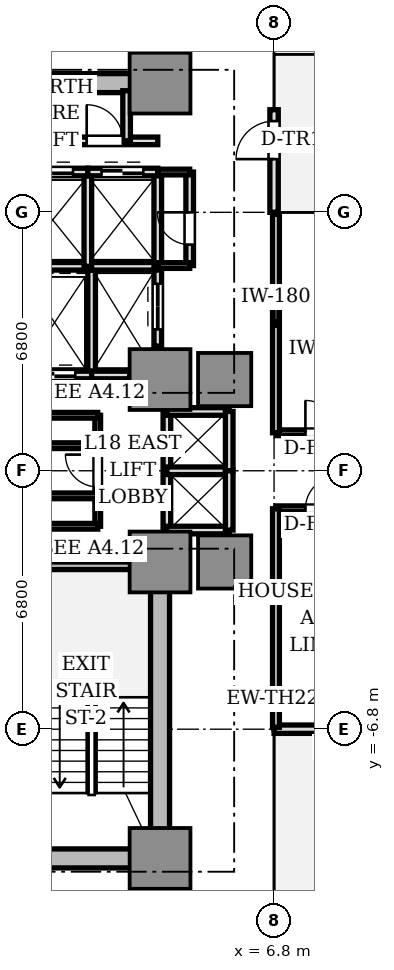
"""IFC4 building model, lengths in metres.
Left out: names, types, materials, properties, quantities, classifications, styles, units other than length and angle.
Written with IfcOpenShell. Run it as: python <this file> out.ifc"""

import sys

from ifc_helpers import new_model, si_unit, direction, frame, frame_2d, origin, origin_2d, place, context, subcontext, project, spatial, rectangle, extrude, source, transform, mapped, element, fill, save


model = new_model("IFC4")
c1 = context("Model", 3, precision=1e-05, world=origin(), true_north=direction((0.0, 1.0)))
c2 = subcontext(c1, "Body", "Model", "MODEL_VIEW")
j1 = project(units=[si_unit("LENGTHUNIT", "METRE"), si_unit("PLANEANGLEUNIT", "RADIAN")], contexts=[c1])
p1 = place(None, origin())
s1 = spatial("IfcSite", under=j1, at=p1, CompositionType="ELEMENT")
p2 = place(p1, origin())
s2 = spatial("IfcBuilding", under=s1, at=p2, CompositionType="ELEMENT")
p3 = place(p2, frame((0.0, 0.0, 67.8)))
s3 = spatial("IfcBuildingStorey", under=s2, at=p3, CompositionType="ELEMENT", Elevation=67.8)
for number, where, z_axis, x_axis in (
    (1, (-3.55, 10.2, 0.0), (0.0, 0.0, 1.0), (1.0, 0.0, 0.0)),
    (2, (-3.55, -10.2, 0.0), (0.0, 0.0, 1.0), (1.0, 0.0, 0.0)),
):
    element("IfcWall", number, at=place(p3, frame(where, z_axis=z_axis, x_axis=x_axis)), inside=s3, PredefinedType="SHEAR", context=c2, shape_type="SweptSolid", body=[
        extrude(rectangle(XDim=7.1, YDim=0.5, at=frame_2d((3.55, 0.0))), origin(), (0.0, 0.0, 1.0), 3.11),
    ])
p4 = place(p3, frame((3.8, -9.75, 0.0), z_axis=(0.0, 0.0, 1.0), x_axis=(0.0, 1.0, 0.0)))
e3 = element("IfcWall", 3, at=p4, inside=s3, PredefinedType="SHEAR", context=c2, shape_type="SweptSolid", body=[
    extrude(rectangle(XDim=6.9, YDim=0.5, at=frame_2d((3.45, 0.0))), origin(), (0.0, 0.0, 1.0), 3.11),
])
m1 = source(origin(), c2, "Body", "SweptSolid", [
    extrude(rectangle(XDim=1.6, YDim=1.6, at=origin_2d()), origin(), (0.0, 0.0, 1.0), 3.11),
])
for number, where, z_axis, x_axis in (
    (4, (3.8, 2.4, 0.0), (0.0, 0.0, 1.0), (1.0, 0.0, 0.0)),
    (5, (3.8, 10.2, 0.0), (0.0, 0.0, 1.0), (1.0, 0.0, 0.0)),
    (6, (3.8, -2.4, 0.0), (0.0, 0.0, 1.0), (1.0, 0.0, 0.0)),
    (7, (3.8, -10.2, 0.0), (0.0, 0.0, 1.0), (1.0, 0.0, 0.0)),
):
    element("IfcColumn", number, at=place(p3, frame(where, z_axis=z_axis, x_axis=x_axis)), inside=s3, PredefinedType="COLUMN", context=c2, shape_type="MappedRepresentation", body=[
        mapped(m1, transform((0.0, 0.0, 0.0), scale=1.0)),
    ])
m2 = source(origin(), c2, "Body", "SweptSolid", [
    extrude(rectangle(XDim=1.4, YDim=1.4, at=origin_2d()), origin(), (0.0, 0.0, 1.0), 3.11),
])
for number, where, z_axis, x_axis in (
    (8, (5.5, 2.4, 0.0), (0.0, 0.0, 1.0), (1.0, 0.0, 0.0)),
    (9, (5.5, -2.4, 0.0), (0.0, 0.0, 1.0), (1.0, 0.0, 0.0)),
):
    element("IfcColumn", number, at=place(p3, frame(where, z_axis=z_axis, x_axis=x_axis)), inside=s3, PredefinedType="COLUMN", context=c2, shape_type="MappedRepresentation", body=[
        mapped(m2, transform((0.0, 0.0, 0.0), scale=1.0)),
    ])
p5 = place(p3, frame((6.8, -6.8, 0.0), z_axis=(0.0, 0.0, 1.0), x_axis=(1.0, 0.0, 0.0)))
e10 = element("IfcWall", 10, at=p5, inside=s3, PredefinedType="STANDARD", context=c2, shape_type="SweptSolid", body=[
    extrude(rectangle(XDim=2.7, YDim=0.22, at=frame_2d((1.35, 0.0))), origin(), (0.0, 0.0, 1.0), 3.11),
])
p6 = place(p5, frame((1.4, 0.0, 0.0)))
e11 = element("IfcOpeningElement", 11, at=p6, cuts=e10, PredefinedType="OPENING", context=c2, shape_type="SweptSolid", body=[
    extrude(rectangle(XDim=1.0, YDim=2.2, at=frame_2d((0.5, 1.1))), frame((0.0, 0.12, 0.0), z_axis=(0.0, -1.0, 0.0), x_axis=(1.0, 0.0, 0.0)), (0.0, 0.0, 1.0), 0.24),
])
p7 = place(p3, frame((6.8, 6.8, 0.0), z_axis=(0.0, 0.0, 1.0), x_axis=(0.0, 1.0, 0.0)))
e12 = element("IfcWall", 12, at=p7, inside=s3, PredefinedType="STANDARD", context=c2, shape_type="SweptSolid", body=[
    extrude(rectangle(XDim=2.7, YDim=0.22, at=frame_2d((1.35, 0.0))), origin(), (0.0, 0.0, 1.0), 3.11),
])
p8 = place(p7, frame((1.4, 0.0, 0.0)))
e13 = element("IfcOpeningElement", 13, at=p8, cuts=e12, PredefinedType="OPENING", context=c2, shape_type="SweptSolid", body=[
    extrude(rectangle(XDim=1.0, YDim=2.2, at=frame_2d((0.5, 1.1))), frame((0.0, 0.12, 0.0), z_axis=(0.0, -1.0, 0.0), x_axis=(1.0, 0.0, 0.0)), (0.0, 0.0, 1.0), 0.24),
])
p9 = place(p3, frame((0.0, -2.5, 0.0), z_axis=(0.0, 0.0, 1.0), x_axis=(1.0, 0.0, 0.0)))
e14 = element("IfcWall", 14, at=p9, inside=s3, PredefinedType="SOLIDWALL", context=c2, shape_type="SweptSolid", body=[
    extrude(rectangle(XDim=3.72, YDim=0.2, at=frame_2d((1.86, 0.0))), origin(), (0.0, 0.0, 1.0), 3.11),
])
p10 = place(p3, frame((2.0, 2.5, 0.0), z_axis=(0.0, 0.0, 1.0), x_axis=(0.0, 1.0, 0.0)))
e15 = element("IfcWall", 15, at=p10, inside=s3, PredefinedType="SOLIDWALL", context=c2, shape_type="SweptSolid", body=[
    extrude(rectangle(XDim=2.78, YDim=0.2, at=frame_2d((1.39, 0.0))), origin(), (0.0, 0.0, 1.0), 2.66),
])
p11 = place(p3, frame((0.05, 2.52, 0.0), z_axis=(0.0, 0.0, 1.0), x_axis=(1.0, 0.0, 0.0)))
e16 = element("IfcWall", 16, at=p11, inside=s3, PredefinedType="SOLIDWALL", context=c2, shape_type="SweptSolid", body=[
    extrude(rectangle(XDim=1.95, YDim=0.2, at=frame_2d((0.975, 0.0))), origin(), (0.0, 0.0, 1.0), 2.66),
])
p12 = place(p11, frame((0.42, 0.0, 0.0)))
e17 = element("IfcOpeningElement", 17, at=p12, cuts=e16, PredefinedType="OPENING", context=c2, shape_type="SweptSolid", body=[
    extrude(rectangle(XDim=1.1, YDim=2.2, at=frame_2d((0.55, 1.1))), frame((0.0, 0.11, 0.0), z_axis=(0.0, -1.0, 0.0), x_axis=(1.0, 0.0, 0.0)), (0.0, 0.0, 1.0), 0.22),
])
p13 = place(p3, frame((2.0, 2.52, 0.0), z_axis=(0.0, 0.0, 1.0), x_axis=(1.0, 0.0, 0.0)))
e18 = element("IfcWall", 18, at=p13, inside=s3, PredefinedType="SOLIDWALL", context=c2, shape_type="SweptSolid", body=[
    extrude(rectangle(XDim=1.0, YDim=0.2, at=frame_2d((0.5, 0.0))), origin(), (0.0, 0.0, 1.0), 2.66),
])
p14 = place(p3, frame((3.74, 3.28, 0.0), z_axis=(0.0, 0.0, 1.0), x_axis=(0.0, 1.0, 0.0)))
e19 = element("IfcWall", 19, at=p14, inside=s3, PredefinedType="SOLIDWALL", context=c2, shape_type="SweptSolid", body=[
    extrude(rectangle(XDim=2.08, YDim=0.2, at=frame_2d((1.04, 0.0))), origin(), (0.0, 0.0, 1.0), 2.66),
])
p15 = place(p14, frame((0.44, 0.0, 0.0)))
e20 = element("IfcOpeningElement", 20, at=p15, cuts=e19, PredefinedType="OPENING", context=c2, shape_type="SweptSolid", body=[
    extrude(rectangle(XDim=1.2, YDim=2.2, at=frame_2d((0.6, 1.1))), frame((0.0, 0.11, 0.0), z_axis=(0.0, -1.0, 0.0), x_axis=(1.0, 0.0, 0.0)), (0.0, 0.0, 1.0), 0.22),
])
p16 = place(p3, frame((0.05, 5.38, 0.0), z_axis=(0.0, 0.0, 1.0), x_axis=(1.0, 0.0, 0.0)))
e21 = element("IfcWall", 21, at=p16, inside=s3, PredefinedType="SOLIDWALL", context=c2, shape_type="SweptSolid", body=[
    extrude(rectangle(XDim=3.69, YDim=0.2, at=frame_2d((1.845, 0.0))), origin(), (0.0, 0.0, 1.0), 2.66),
])
p17 = place(p3, frame((1.9, 5.38, 0.0), z_axis=(0.0, 0.0, 1.0), x_axis=(0.0, 1.0, 0.0)))
e22 = element("IfcWall", 22, at=p17, inside=s3, PredefinedType="SOLIDWALL", context=c2, shape_type="SweptSolid", body=[
    extrude(rectangle(XDim=2.48, YDim=0.2, at=frame_2d((1.24, 0.0))), origin(), (0.0, 0.0, 1.0), 2.66),
])
p18 = place(p3, frame((0.05, 7.86, 0.0), z_axis=(0.0, 0.0, 1.0), x_axis=(1.0, 0.0, 0.0)))
e23 = element("IfcWall", 23, at=p18, inside=s3, PredefinedType="SOLIDWALL", context=c2, shape_type="SweptSolid", body=[
    extrude(rectangle(XDim=1.85, YDim=0.2, at=frame_2d((0.925, 0.0))), origin(), (0.0, 0.0, 1.0), 2.66),
])
p19 = place(p18, frame((0.36, 0.0, 0.0)))
e24 = element("IfcOpeningElement", 24, at=p19, cuts=e23, PredefinedType="OPENING", context=c2, shape_type="SweptSolid", body=[
    extrude(rectangle(XDim=1.1, YDim=2.2, at=frame_2d((0.55, 1.1))), frame((0.0, 0.11, 0.0), z_axis=(0.0, -1.0, 0.0), x_axis=(1.0, 0.0, 0.0)), (0.0, 0.0, 1.0), 0.22),
])
p20 = place(p3, frame((3.74, 5.38, 0.0), z_axis=(0.0, 0.0, 1.0), x_axis=(0.0, 1.0, 0.0)))
e25 = element("IfcWall", 25, at=p20, inside=s3, PredefinedType="SOLIDWALL", context=c2, shape_type="SweptSolid", body=[
    extrude(rectangle(XDim=2.48, YDim=0.2, at=frame_2d((1.24, 0.0))), origin(), (0.0, 0.0, 1.0), 2.66),
])
p21 = place(p3, frame((1.9, 7.86, 0.0), z_axis=(0.0, 0.0, 1.0), x_axis=(1.0, 0.0, 0.0)))
e26 = element("IfcWall", 26, at=p21, inside=s3, PredefinedType="SOLIDWALL", context=c2, shape_type="SweptSolid", body=[
    extrude(rectangle(XDim=1.84, YDim=0.2, at=frame_2d((0.92, 0.0))), origin(), (0.0, 0.0, 1.0), 2.66),
])
p22 = place(p21, frame((0.36, 0.0, 0.0)))
e27 = element("IfcOpeningElement", 27, at=p22, cuts=e26, PredefinedType="OPENING", context=c2, shape_type="SweptSolid", body=[
    extrude(rectangle(XDim=1.1, YDim=2.2, at=frame_2d((0.55, 1.1))), frame((0.0, 0.11, 0.0), z_axis=(0.0, -1.0, 0.0), x_axis=(1.0, 0.0, 0.0)), (0.0, 0.0, 1.0), 0.22),
])
p23 = place(p3, frame((3.98, -1.56, 0.0), z_axis=(0.0, 0.0, 1.0), x_axis=(0.0, 1.0, 0.0)))
e28 = element("IfcWall", 28, at=p23, inside=s3, PredefinedType="SOLIDWALL", context=c2, shape_type="SweptSolid", body=[
    extrude(rectangle(XDim=3.12, YDim=0.2, at=frame_2d((1.56, 0.0))), origin(), (0.0, 0.0, 1.0), 2.18),
])
for number, where, z_axis, x_axis in (
    (29, (3.98, 1.56, 0.0), (0.0, 0.0, 1.0), (1.0, 0.0, 0.0)),
    (30, (3.98, -1.56, 0.0), (0.0, 0.0, 1.0), (1.0, 0.0, 0.0)),
    (31, (3.98, 0.0, 0.0), (0.0, 0.0, 1.0), (1.0, 0.0, 0.0)),
):
    element("IfcWall", number, at=place(p3, frame(where, z_axis=z_axis, x_axis=x_axis)), inside=s3, PredefinedType="SOLIDWALL", context=c2, shape_type="SweptSolid", body=[
        extrude(rectangle(XDim=1.64, YDim=0.2, at=frame_2d((0.82, 0.0))), origin(), (0.0, 0.0, 1.0), 2.66),
    ])
for number, where, z_axis, x_axis in (
    (32, (5.62, 0.0, 0.0), (0.0, 0.0, 1.0), (0.0, 1.0, 0.0)),
    (33, (5.62, -1.56, 0.0), (0.0, 0.0, 1.0), (0.0, 1.0, 0.0)),
):
    element("IfcWall", number, at=place(p3, frame(where, z_axis=z_axis, x_axis=x_axis)), inside=s3, PredefinedType="SOLIDWALL", context=c2, shape_type="SweptSolid", body=[
        extrude(rectangle(XDim=1.56, YDim=0.2, at=frame_2d((0.78, 0.0))), origin(), (0.0, 0.0, 1.0), 2.66),
    ])
p24 = place(p3, frame((0.12, 8.68, 0.0), z_axis=(0.0, 0.0, 1.0), x_axis=(1.0, 0.0, 0.0)))
e34 = element("IfcWall", 34, at=p24, inside=s3, PredefinedType="SOLIDWALL", context=c2, shape_type="SweptSolid", body=[
    extrude(rectangle(XDim=3.62, YDim=0.2, at=frame_2d((1.81, 0.0))), origin(), (0.0, 0.0, 1.0), 2.66),
])
p25 = place(p24, frame((1.75, 0.0, 0.0)))
e35 = element("IfcOpeningElement", 35, at=p25, cuts=e34, PredefinedType="OPENING", context=c2, shape_type="SweptSolid", body=[
    extrude(rectangle(XDim=0.95, YDim=2.15, at=frame_2d((0.475, 1.075))), frame((0.0, 0.11, 0.0), z_axis=(0.0, -1.0, 0.0), x_axis=(1.0, 0.0, 0.0)), (0.0, 0.0, 1.0), 0.22),
])
p26 = place(p3, frame((2.92, 8.68, 0.0), z_axis=(0.0, 0.0, 1.0), x_axis=(0.0, 1.0, 0.0)))
e36 = element("IfcWall", 36, at=p26, inside=s3, PredefinedType="SOLIDWALL", context=c2, shape_type="SweptSolid", body=[
    extrude(rectangle(XDim=1.32, YDim=0.2, at=frame_2d((0.66, 0.0))), origin(), (0.0, 0.0, 1.0), 2.66),
])
p27 = place(p3, frame((4.58, 5.4, 0.0), z_axis=(0.0, 0.0, 1.0), x_axis=(0.0, 1.0, 0.0)))
e37 = element("IfcWall", 37, at=p27, inside=s3, PredefinedType="SOLIDWALL", context=c2, shape_type="SweptSolid", body=[
    extrude(rectangle(XDim=2.46, YDim=0.2, at=frame_2d((1.23, 0.0))), origin(), (0.0, 0.0, 1.0), 2.66),
])
p28 = place(p27, frame((0.55, 0.0, 0.0)))
e38 = element("IfcOpeningElement", 38, at=p28, cuts=e37, PredefinedType="OPENING", context=c2, shape_type="SweptSolid", body=[
    extrude(rectangle(XDim=0.85, YDim=2.1, at=frame_2d((0.425, 1.05))), frame((0.0, 0.11, 0.0), z_axis=(0.0, -1.0, 0.0), x_axis=(1.0, 0.0, 0.0)), (0.0, 0.0, 1.0), 0.22),
])
for number, where, z_axis, x_axis in (
    (39, (3.74, 5.4, 0.0), (0.0, 0.0, 1.0), (1.0, 0.0, 0.0)),
    (40, (3.74, 7.86, 0.0), (0.0, 0.0, 1.0), (1.0, 0.0, 0.0)),
):
    element("IfcWall", number, at=place(p3, frame(where, z_axis=z_axis, x_axis=x_axis)), inside=s3, PredefinedType="PARTITIONING", context=c2, shape_type="SweptSolid", body=[
        extrude(rectangle(XDim=0.84, YDim=0.15, at=frame_2d((0.42, 0.0))), origin(), (0.0, 0.0, 1.0), 2.66),
    ])
p29 = place(p3, frame((2.16, -1.46, 0.0), z_axis=(0.0, 0.0, 1.0), x_axis=(0.0, 1.0, 0.0)))
e41 = element("IfcWall", 41, at=p29, inside=s3, PredefinedType="PARTITIONING", context=c2, shape_type="SweptSolid", body=[
    extrude(rectangle(XDim=2.92, YDim=0.15, at=frame_2d((1.46, 0.0))), origin(), (0.0, 0.0, 1.0), 2.66),
])
p30 = place(p29, frame((1.035, 0.0, 0.0)))
e42 = element("IfcOpeningElement", 42, at=p30, cuts=e41, PredefinedType="OPENING", context=c2, shape_type="SweptSolid", body=[
    extrude(rectangle(XDim=0.85, YDim=2.1, at=frame_2d((0.425, 1.05))), frame((0.0, 0.085, 0.0), z_axis=(0.0, -1.0, 0.0), x_axis=(1.0, 0.0, 0.0)), (0.0, 0.0, 1.0), 0.17),
])
p31 = place(p3, frame((-2.16, 1.46, 0.0), z_axis=(0.0, 0.0, 1.0), x_axis=(1.0, 0.0, 0.0)))
e43 = element("IfcWall", 43, at=p31, inside=s3, PredefinedType="PARTITIONING", context=c2, shape_type="SweptSolid", body=[
    extrude(rectangle(XDim=4.32, YDim=0.15, at=frame_2d((2.16, 0.0))), origin(), (0.0, 0.0, 1.0), 2.66),
])
p32 = place(p31, frame((1.73, 0.0, 0.0)))
e44 = element("IfcOpeningElement", 44, at=p32, cuts=e43, PredefinedType="OPENING", context=c2, shape_type="SweptSolid", body=[
    extrude(rectangle(XDim=0.85, YDim=2.1, at=frame_2d((0.425, 1.05))), frame((0.0, 0.085, 0.0), z_axis=(0.0, -1.0, 0.0), x_axis=(1.0, 0.0, 0.0)), (0.0, 0.0, 1.0), 0.17),
])
p33 = place(p3, frame((-2.16, -1.46, 0.0), z_axis=(0.0, 0.0, 1.0), x_axis=(1.0, 0.0, 0.0)))
e45 = element("IfcWall", 45, at=p33, inside=s3, PredefinedType="PARTITIONING", context=c2, shape_type="SweptSolid", body=[
    extrude(rectangle(XDim=4.32, YDim=0.15, at=frame_2d((2.16, 0.0))), origin(), (0.0, 0.0, 1.0), 2.66),
])
p34 = place(p33, frame((1.73, 0.0, 0.0)))
e46 = element("IfcOpeningElement", 46, at=p34, cuts=e45, PredefinedType="OPENING", context=c2, shape_type="SweptSolid", body=[
    extrude(rectangle(XDim=0.85, YDim=2.1, at=frame_2d((0.425, 1.05))), frame((0.0, 0.085, 0.0), z_axis=(0.0, -1.0, 0.0), x_axis=(1.0, 0.0, 0.0)), (0.0, 0.0, 1.0), 0.17),
])
for number, where, z_axis, x_axis in (
    (47, (-2.16, 0.66, 0.0), (0.0, 0.0, 1.0), (1.0, 0.0, 0.0)),
    (48, (-2.16, -0.66, 0.0), (0.0, 0.0, 1.0), (1.0, 0.0, 0.0)),
):
    element("IfcWall", number, at=place(p3, frame(where, z_axis=z_axis, x_axis=x_axis)), inside=s3, PredefinedType="PARTITIONING", context=c2, shape_type="SweptSolid", body=[
        extrude(rectangle(XDim=4.32, YDim=0.15, at=frame_2d((2.16, 0.0))), origin(), (0.0, 0.0, 1.0), 2.66),
    ])
p35 = place(p3, frame((6.85, 1.0, 0.0), z_axis=(0.0, 0.0, 1.0), x_axis=(1.0, 0.0, 0.0)))
e49 = element("IfcWall", 49, at=p35, inside=s3, PredefinedType="PARTITIONING", context=c2, shape_type="SweptSolid", body=[
    extrude(rectangle(XDim=2.5, YDim=0.15, at=frame_2d((1.25, 0.0))), origin(), (0.0, 0.0, 1.0), 2.66),
])
p36 = place(p35, frame((0.775, 0.0, 0.0)))
e50 = element("IfcOpeningElement", 50, at=p36, cuts=e49, PredefinedType="OPENING", context=c2, shape_type="SweptSolid", body=[
    extrude(rectangle(XDim=0.85, YDim=2.1, at=frame_2d((0.425, 1.05))), frame((0.0, 0.085, 0.0), z_axis=(0.0, -1.0, 0.0), x_axis=(1.0, 0.0, 0.0)), (0.0, 0.0, 1.0), 0.17),
])
p37 = place(p3, frame((6.85, -1.0, 0.0), z_axis=(0.0, 0.0, 1.0), x_axis=(1.0, 0.0, 0.0)))
e51 = element("IfcWall", 51, at=p37, inside=s3, PredefinedType="PARTITIONING", context=c2, shape_type="SweptSolid", body=[
    extrude(rectangle(XDim=2.5, YDim=0.15, at=frame_2d((1.25, 0.0))), origin(), (0.0, 0.0, 1.0), 2.66),
])
p38 = place(p37, frame((0.775, 0.0, 0.0)))
e52 = element("IfcOpeningElement", 52, at=p38, cuts=e51, PredefinedType="OPENING", context=c2, shape_type="SweptSolid", body=[
    extrude(rectangle(XDim=0.85, YDim=2.1, at=frame_2d((0.425, 1.05))), frame((0.0, 0.085, 0.0), z_axis=(0.0, -1.0, 0.0), x_axis=(1.0, 0.0, 0.0)), (0.0, 0.0, 1.0), 0.17),
])
for number, where, z_axis, x_axis in (
    (53, (6.85, 1.0, 0.0), (0.0, 0.0, 1.0), (0.0, 1.0, 0.0)),
    (54, (6.85, -6.75, 0.0), (0.0, 0.0, 1.0), (0.0, 1.0, 0.0)),
):
    element("IfcWall", number, at=place(p3, frame(where, z_axis=z_axis, x_axis=x_axis)), inside=s3, PredefinedType="PARTITIONING", context=c2, shape_type="SweptSolid", body=[
        extrude(rectangle(XDim=5.75, YDim=0.18, at=frame_2d((2.875, 0.0))), origin(), (0.0, 0.0, 1.0), 2.66),
    ])
m3 = source(origin(), c2, "Body", "SweptSolid", [
    extrude(rectangle(XDim=1.0, YDim=0.05, at=origin_2d()), origin(), (0.0, 0.0, 1.0), 2.2),
])
p39 = place(p8, frame((0.5, 0.0, 0.0)))
e55 = element("IfcDoor", 55, at=p39, inside=s3, OperationType="SINGLE_SWING_LEFT", PredefinedType="DOOR", context=c2, shape_type="MappedRepresentation", body=[
    mapped(m3, transform((0.0, 0.0, 0.0), scale=1.0)),
])
fill(e13, e55)
m4 = source(origin(), c2, "Body", "SweptSolid", [
    extrude(rectangle(XDim=1.1, YDim=0.05, at=origin_2d()), origin(), (0.0, 0.0, 1.0), 2.2),
])
p40 = place(p12, frame((0.55, 0.0, 0.0)))
e56 = element("IfcDoor", 56, at=p40, inside=s3, OperationType="DOUBLE_DOOR_SLIDING", PredefinedType="DOOR", context=c2, shape_type="MappedRepresentation", body=[
    mapped(m4, transform((0.0, 0.0, 0.0), scale=1.0)),
])
fill(e17, e56)
m5 = source(origin(), c2, "Body", "SweptSolid", [
    extrude(rectangle(XDim=1.2, YDim=0.05, at=origin_2d()), origin(), (0.0, 0.0, 1.0), 2.2),
])
p41 = place(p15, frame((0.6, 0.0, 0.0)))
e57 = element("IfcDoor", 57, at=p41, inside=s3, OperationType="DOUBLE_DOOR_SLIDING", PredefinedType="DOOR", context=c2, shape_type="MappedRepresentation", body=[
    mapped(m5, transform((0.0, 0.0, 0.0), scale=1.0)),
])
fill(e20, e57)
p42 = place(p19, frame((0.55, 0.0, 0.0)))
e58 = element("IfcDoor", 58, at=p42, inside=s3, OperationType="DOUBLE_DOOR_SLIDING", PredefinedType="DOOR", context=c2, shape_type="MappedRepresentation", body=[
    mapped(m4, transform((0.0, 0.0, 0.0), scale=1.0)),
])
fill(e24, e58)
p43 = place(p22, frame((0.55, 0.0, 0.0)))
e59 = element("IfcDoor", 59, at=p43, inside=s3, OperationType="DOUBLE_DOOR_SLIDING", PredefinedType="DOOR", context=c2, shape_type="MappedRepresentation", body=[
    mapped(m4, transform((0.0, 0.0, 0.0), scale=1.0)),
])
fill(e27, e59)
m6 = source(origin(), c2, "Body", "SweptSolid", [
    extrude(rectangle(XDim=0.95, YDim=0.05, at=origin_2d()), origin(), (0.0, 0.0, 1.0), 2.15),
])
p44 = place(p25, frame((0.475, 0.0, 0.0)))
e60 = element("IfcDoor", 60, at=p44, inside=s3, OperationType="SINGLE_SWING_LEFT", PredefinedType="DOOR", context=c2, shape_type="MappedRepresentation", body=[
    mapped(m6, transform((0.0, 0.0, 0.0), scale=1.0)),
])
fill(e35, e60)
m7 = source(origin(), c2, "Body", "SweptSolid", [
    extrude(rectangle(XDim=0.85, YDim=0.05, at=origin_2d()), origin(), (0.0, 0.0, 1.0), 2.1),
])
p45 = place(p28, frame((0.425, 0.0, 0.0)))
e61 = element("IfcDoor", 61, at=p45, inside=s3, OperationType="SINGLE_SWING_RIGHT", PredefinedType="DOOR", context=c2, shape_type="MappedRepresentation", body=[
    mapped(m7, transform((0.0, 0.0, 0.0), scale=1.0)),
])
fill(e38, e61)
p46 = place(p30, frame((0.425, 0.0, 0.0)))
e62 = element("IfcDoor", 62, at=p46, inside=s3, OperationType="SINGLE_SWING_RIGHT", PredefinedType="DOOR", context=c2, shape_type="MappedRepresentation", body=[
    mapped(m7, transform((0.0, 0.0, 0.0), scale=1.0)),
])
fill(e42, e62)
p47 = place(p38, frame((0.425, 0.0, 0.0)))
e63 = element("IfcDoor", 63, at=p47, inside=s3, OperationType="SINGLE_SWING_RIGHT", PredefinedType="DOOR", context=c2, shape_type="MappedRepresentation", body=[
    mapped(m7, transform((0.0, 0.0, 0.0), scale=1.0)),
])
fill(e52, e63)
p48 = place(p36, frame((0.425, 0.0, 0.0)))
e64 = element("IfcDoor", 64, at=p48, inside=s3, OperationType="SINGLE_SWING_LEFT", PredefinedType="DOOR", context=c2, shape_type="MappedRepresentation", body=[
    mapped(m7, transform((0.0, 0.0, 0.0), scale=1.0)),
])
fill(e50, e64)
save(model, sys.argv[1])
